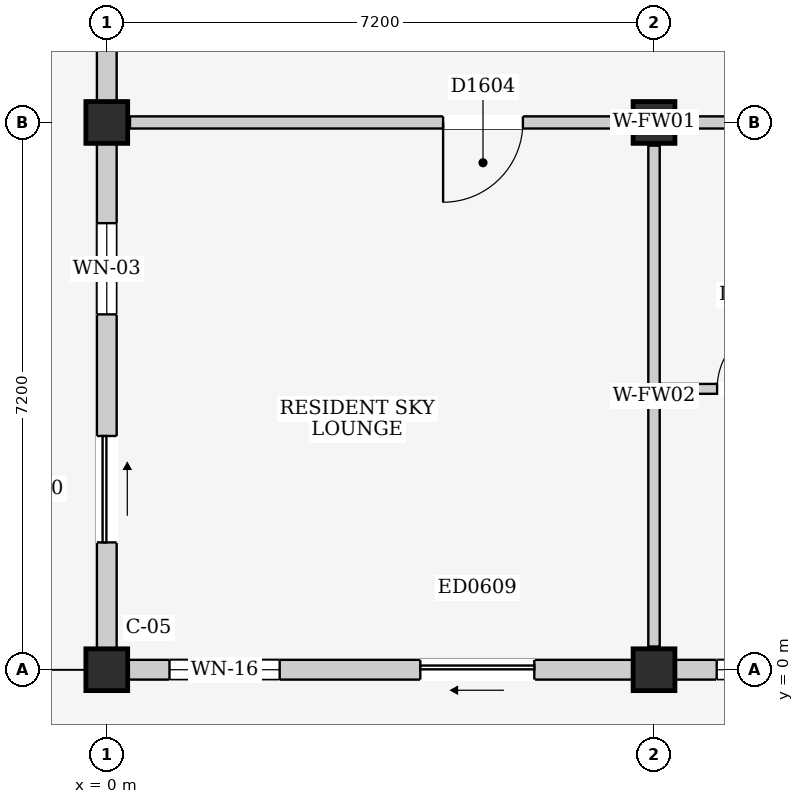
"""IFC4 building model, lengths in metres.
Left out: names, types, materials, properties, quantities, classifications, styles, units other than length and angle.
Written with IfcOpenShell. Run it as: python <this file> out.ifc"""

import sys

from ifc_helpers import new_model, si_unit, direction, frame, frame_2d, origin, origin_2d, place, context, subcontext, project, spatial, rectangle, extrude, element, fill, save


model = new_model("IFC4")
c1 = context("Model", 3, precision=1e-05, world=origin(), true_north=direction((0.0, 1.0)))
c2 = subcontext(c1, "Body", "Model", "MODEL_VIEW")
j1 = project(units=[si_unit("LENGTHUNIT", "METRE"), si_unit("PLANEANGLEUNIT", "RADIAN")], contexts=[c1])
p1 = place(None, origin())
s1 = spatial("IfcSite", under=j1, at=p1, CompositionType="ELEMENT")
p2 = place(p1, origin())
s2 = spatial("IfcBuilding", under=s1, at=p2, CompositionType="ELEMENT")
p3 = place(p2, frame((0.0, 0.0, 25.1)))
s3 = spatial("IfcBuildingStorey", under=s2, at=p3, CompositionType="ELEMENT", Elevation=25.1)
for number, where, z_axis, x_axis in (
    (1, (0.0, 0.0, 0.0), (0.0, 0.0, 1.0), (1.0, 0.0, 0.0)),
    (2, (0.0, 7.2, 0.0), (0.0, 0.0, 1.0), (1.0, 0.0, 0.0)),
    (3, (7.2, 0.0, 0.0), (0.0, 0.0, 1.0), (1.0, 0.0, 0.0)),
    (4, (7.2, 7.2, 0.0), (0.0, 0.0, 1.0), (1.0, 0.0, 0.0)),
):
    element("IfcColumn", number, at=place(p3, frame(where, z_axis=z_axis, x_axis=x_axis)), inside=s3, PredefinedType="COLUMN", context=c2, shape_type="SweptSolid", body=[
        extrude(rectangle(XDim=0.55, YDim=0.55, at=origin_2d()), origin(), (0.0, 0.0, 1.0), 3.2),
    ])
p4 = place(p3, frame((0.275, 0.0, 0.0), z_axis=(0.0, 0.0, 1.0), x_axis=(1.0, 0.0, 0.0)))
e5 = element("IfcWall", 5, at=p4, inside=s3, PredefinedType="ELEMENTEDWALL", context=c2, shape_type="SweptSolid", body=[
    extrude(rectangle(XDim=6.65, YDim=0.26, at=frame_2d((3.325, 0.0))), origin(), (0.0, 0.0, 1.0), 2.525),
])
p5 = place(p4, frame((3.85, 0.0, 0.0)))
e6 = element("IfcOpeningElement", 6, at=p5, cuts=e5, PredefinedType="OPENING", context=c2, shape_type="SweptSolid", body=[
    extrude(rectangle(XDim=1.5, YDim=2.12, at=frame_2d((0.75, 1.06))), frame((0.0, 0.145, 0.0), z_axis=(0.0, -1.0, 0.0), x_axis=(1.0, 0.0, 0.0)), (0.0, 0.0, 1.0), 0.29),
])
p6 = place(p4, frame((0.55, 0.0, 0.9)))
e7 = element("IfcOpeningElement", 7, at=p6, cuts=e5, PredefinedType="OPENING", context=c2, shape_type="SweptSolid", body=[
    extrude(rectangle(XDim=1.45, YDim=1.4, at=frame_2d((0.725, 0.7))), frame((0.0, 0.145, 0.0), z_axis=(0.0, -1.0, 0.0), x_axis=(1.0, 0.0, 0.0)), (0.0, 0.0, 1.0), 0.29),
])
p7 = place(p3, frame((0.0, 0.275, 0.0), z_axis=(0.0, 0.0, 1.0), x_axis=(0.0, 1.0, 0.0)))
e8 = element("IfcWall", 8, at=p7, inside=s3, PredefinedType="ELEMENTEDWALL", context=c2, shape_type="SweptSolid", body=[
    extrude(rectangle(XDim=6.65, YDim=0.26, at=frame_2d((3.325, 0.0))), origin(), (0.0, 0.0, 1.0), 2.525),
])
p8 = place(p7, frame((1.4, 0.0, 0.0)))
e9 = element("IfcOpeningElement", 9, at=p8, cuts=e8, PredefinedType="OPENING", context=c2, shape_type="SweptSolid", body=[
    extrude(rectangle(XDim=1.4, YDim=2.1, at=frame_2d((0.7, 1.05))), frame((0.0, 0.145, 0.0), z_axis=(0.0, -1.0, 0.0), x_axis=(1.0, 0.0, 0.0)), (0.0, 0.0, 1.0), 0.29),
])
p9 = place(p7, frame((4.4, 0.0, 0.95)))
e10 = element("IfcOpeningElement", 10, at=p9, cuts=e8, PredefinedType="OPENING", context=c2, shape_type="SweptSolid", body=[
    extrude(rectangle(XDim=1.2, YDim=1.35, at=frame_2d((0.6, 0.675))), frame((0.0, 0.145, 0.0), z_axis=(0.0, -1.0, 0.0), x_axis=(1.0, 0.0, 0.0)), (0.0, 0.0, 1.0), 0.29),
])
p10 = place(p3, frame((0.0, 7.475, 0.0), z_axis=(0.0, 0.0, 1.0), x_axis=(0.0, 1.0, 0.0)))
e11 = element("IfcWall", 11, at=p10, inside=s3, PredefinedType="ELEMENTEDWALL", context=c2, shape_type="SweptSolid", body=[
    extrude(rectangle(XDim=6.65, YDim=0.26, at=frame_2d((3.325, 0.0))), origin(), (0.0, 0.0, 1.0), 2.525),
])
p11 = place(p10, frame((3.65, 0.0, 0.0)))
e12 = element("IfcOpeningElement", 12, at=p11, cuts=e11, PredefinedType="OPENING", context=c2, shape_type="SweptSolid", body=[
    extrude(rectangle(XDim=1.4, YDim=2.1, at=frame_2d((0.7, 1.05))), frame((0.0, 0.145, 0.0), z_axis=(0.0, -1.0, 0.0), x_axis=(1.0, 0.0, 0.0)), (0.0, 0.0, 1.0), 0.29),
])
p12 = place(p3, frame((7.475, 0.0, 0.0), z_axis=(0.0, 0.0, 1.0), x_axis=(1.0, 0.0, 0.0)))
e13 = element("IfcWall", 13, at=p12, inside=s3, PredefinedType="ELEMENTEDWALL", context=c2, shape_type="SweptSolid", body=[
    extrude(rectangle(XDim=6.65, YDim=0.26, at=frame_2d((3.325, 0.0))), origin(), (0.0, 0.0, 1.0), 2.525),
])
p13 = place(p12, frame((3.85, 0.0, 0.0)))
e14 = element("IfcOpeningElement", 14, at=p13, cuts=e13, PredefinedType="OPENING", context=c2, shape_type="SweptSolid", body=[
    extrude(rectangle(XDim=2.4, YDim=2.12, at=frame_2d((1.2, 1.06))), frame((0.0, 0.145, 0.0), z_axis=(0.0, -1.0, 0.0), x_axis=(1.0, 0.0, 0.0)), (0.0, 0.0, 1.0), 0.29),
])
p14 = place(p12, frame((0.55, 0.0, 0.9)))
e15 = element("IfcOpeningElement", 15, at=p14, cuts=e13, PredefinedType="OPENING", context=c2, shape_type="SweptSolid", body=[
    extrude(rectangle(XDim=1.25, YDim=1.3, at=frame_2d((0.625, 0.65))), frame((0.0, 0.145, 0.0), z_axis=(0.0, -1.0, 0.0), x_axis=(1.0, 0.0, 0.0)), (0.0, 0.0, 1.0), 0.29),
])
p15 = place(p3, frame((0.305, 7.2, 0.0), z_axis=(0.0, 0.0, 1.0), x_axis=(1.0, 0.0, 0.0)))
e16 = element("IfcWall", 16, at=p15, inside=s3, PredefinedType="PARTITIONING", context=c2, shape_type="SweptSolid", body=[
    extrude(rectangle(XDim=6.59, YDim=0.16, at=frame_2d((3.295, 0.0))), origin(), (0.0, 0.0, 1.0), 2.375),
])
p16 = place(p15, frame((4.12, 0.0, 0.0)))
e17 = element("IfcOpeningElement", 17, at=p16, cuts=e16, PredefinedType="OPENING", context=c2, shape_type="SweptSolid", body=[
    extrude(rectangle(XDim=1.05, YDim=2.2, at=frame_2d((0.525, 1.1))), frame((0.0, 0.095, 0.0), z_axis=(0.0, -1.0, 0.0), x_axis=(1.0, 0.0, 0.0)), (0.0, 0.0, 1.0), 0.19),
])
p17 = place(p3, frame((7.2, 0.305, 0.0), z_axis=(0.0, 0.0, 1.0), x_axis=(0.0, 1.0, 0.0)))
e18 = element("IfcWall", 18, at=p17, inside=s3, PredefinedType="PARTITIONING", context=c2, shape_type="SweptSolid", body=[
    extrude(rectangle(XDim=6.59, YDim=0.15, at=frame_2d((3.295, 0.0))), origin(), (0.0, 0.0, 1.0), 2.475),
])
p18 = place(p3, frame((7.505, 7.2, 0.0), z_axis=(0.0, 0.0, 1.0), x_axis=(1.0, 0.0, 0.0)))
e19 = element("IfcWall", 19, at=p18, inside=s3, PredefinedType="PARTITIONING", context=c2, shape_type="SweptSolid", body=[
    extrude(rectangle(XDim=6.59, YDim=0.16, at=frame_2d((3.295, 0.0))), origin(), (0.0, 0.0, 1.0), 2.375),
])
p19 = place(p18, frame((5.325, 0.0, 0.0)))
e20 = element("IfcOpeningElement", 20, at=p19, cuts=e19, PredefinedType="OPENING", context=c2, shape_type="SweptSolid", body=[
    extrude(rectangle(XDim=1.0, YDim=2.15, at=frame_2d((0.5, 1.075))), frame((0.0, 0.095, 0.0), z_axis=(0.0, -1.0, 0.0), x_axis=(1.0, 0.0, 0.0)), (0.0, 0.0, 1.0), 0.19),
])
p20 = place(p3, frame((7.28, 3.695, 0.0), z_axis=(0.0, 0.0, 1.0), x_axis=(1.0, 0.0, 0.0)))
e21 = element("IfcWall", 21, at=p20, inside=s3, PredefinedType="PARTITIONING", context=c2, shape_type="SweptSolid", body=[
    extrude(rectangle(XDim=2.4, YDim=0.13, at=frame_2d((1.2, 0.0))), origin(), (0.0, 0.0, 1.0), 2.99),
])
p21 = place(p20, frame((0.75, 0.0, 0.0)))
e22 = element("IfcOpeningElement", 22, at=p21, cuts=e21, PredefinedType="OPENING", context=c2, shape_type="SweptSolid", body=[
    extrude(rectangle(XDim=0.9, YDim=2.1, at=frame_2d((0.45, 1.05))), frame((0.0, 0.08, 0.0), z_axis=(0.0, -1.0, 0.0), x_axis=(1.0, 0.0, 0.0)), (0.0, 0.0, 1.0), 0.16),
])
p22 = place(p5, frame((1.5, 0.0, 0.0), z_axis=(0.0, 0.0, 1.0), x_axis=(-1.0, 0.0, 0.0)))
e23 = element("IfcDoor", 23, at=p22, inside=s3, OperationType="SLIDING_TO_LEFT", PredefinedType="DOOR", context=c2, shape_type="SweptSolid", body=[
    extrude(rectangle(XDim=1.5, YDim=2.12, at=frame_2d((0.75, 1.06))), frame((0.0, 0.025, 0.0), z_axis=(0.0, -1.0, 0.0), x_axis=(1.0, 0.0, 0.0)), (0.0, 0.0, 1.0), 0.05),
])
fill(e6, e23)
p23 = place(p6, origin())
e24 = element("IfcWindow", 24, at=p23, inside=s3, PartitioningType="DOUBLE_PANEL_VERTICAL", PredefinedType="WINDOW", context=c2, shape_type="SweptSolid", body=[
    extrude(rectangle(XDim=1.45, YDim=1.4, at=frame_2d((0.725, 0.7))), frame((0.0, 0.03, 0.0), z_axis=(0.0, -1.0, 0.0), x_axis=(1.0, 0.0, 0.0)), (0.0, 0.0, 1.0), 0.06),
])
fill(e7, e24)
p24 = place(p8, frame((1.4, 0.0, 0.0), z_axis=(0.0, 0.0, 1.0), x_axis=(-1.0, 0.0, 0.0)))
e25 = element("IfcDoor", 25, at=p24, inside=s3, OperationType="SLIDING_TO_RIGHT", PredefinedType="DOOR", context=c2, shape_type="SweptSolid", body=[
    extrude(rectangle(XDim=1.4, YDim=2.1, at=frame_2d((0.7, 1.05))), frame((0.0, 0.025, 0.0), z_axis=(0.0, -1.0, 0.0), x_axis=(1.0, 0.0, 0.0)), (0.0, 0.0, 1.0), 0.05),
])
fill(e9, e25)
p25 = place(p9, origin())
e26 = element("IfcWindow", 26, at=p25, inside=s3, PartitioningType="SINGLE_PANEL", PredefinedType="WINDOW", context=c2, shape_type="SweptSolid", body=[
    extrude(rectangle(XDim=1.2, YDim=1.35, at=frame_2d((0.6, 0.675))), frame((0.0, 0.03, 0.0), z_axis=(0.0, -1.0, 0.0), x_axis=(1.0, 0.0, 0.0)), (0.0, 0.0, 1.0), 0.06),
])
fill(e10, e26)
p26 = place(p14, origin())
e27 = element("IfcWindow", 27, at=p26, inside=s3, PartitioningType="SINGLE_PANEL", PredefinedType="WINDOW", context=c2, shape_type="SweptSolid", body=[
    extrude(rectangle(XDim=1.25, YDim=1.3, at=frame_2d((0.625, 0.65))), frame((0.0, 0.03, 0.0), z_axis=(0.0, -1.0, 0.0), x_axis=(1.0, 0.0, 0.0)), (0.0, 0.0, 1.0), 0.06),
])
fill(e15, e27)
p27 = place(p16, frame((1.05, 0.0, 0.0), z_axis=(0.0, 0.0, 1.0), x_axis=(-1.0, 0.0, 0.0)))
e28 = element("IfcDoor", 28, at=p27, inside=s3, OperationType="SINGLE_SWING_RIGHT", PredefinedType="DOOR", context=c2, shape_type="SweptSolid", body=[
    extrude(rectangle(XDim=1.05, YDim=2.2, at=frame_2d((0.525, 1.1))), frame((0.0, 0.025, 0.0), z_axis=(0.0, -1.0, 0.0), x_axis=(1.0, 0.0, 0.0)), (0.0, 0.0, 1.0), 0.05),
])
fill(e17, e28)
p28 = place(p21, origin())
e29 = element("IfcDoor", 29, at=p28, inside=s3, OperationType="SINGLE_SWING_RIGHT", PredefinedType="DOOR", context=c2, shape_type="SweptSolid", body=[
    extrude(rectangle(XDim=0.9, YDim=2.1, at=frame_2d((0.45, 1.05))), frame((0.0, 0.025, 0.0), z_axis=(0.0, -1.0, 0.0), x_axis=(1.0, 0.0, 0.0)), (0.0, 0.0, 1.0), 0.05),
])
fill(e22, e29)
save(model, sys.argv[1])
